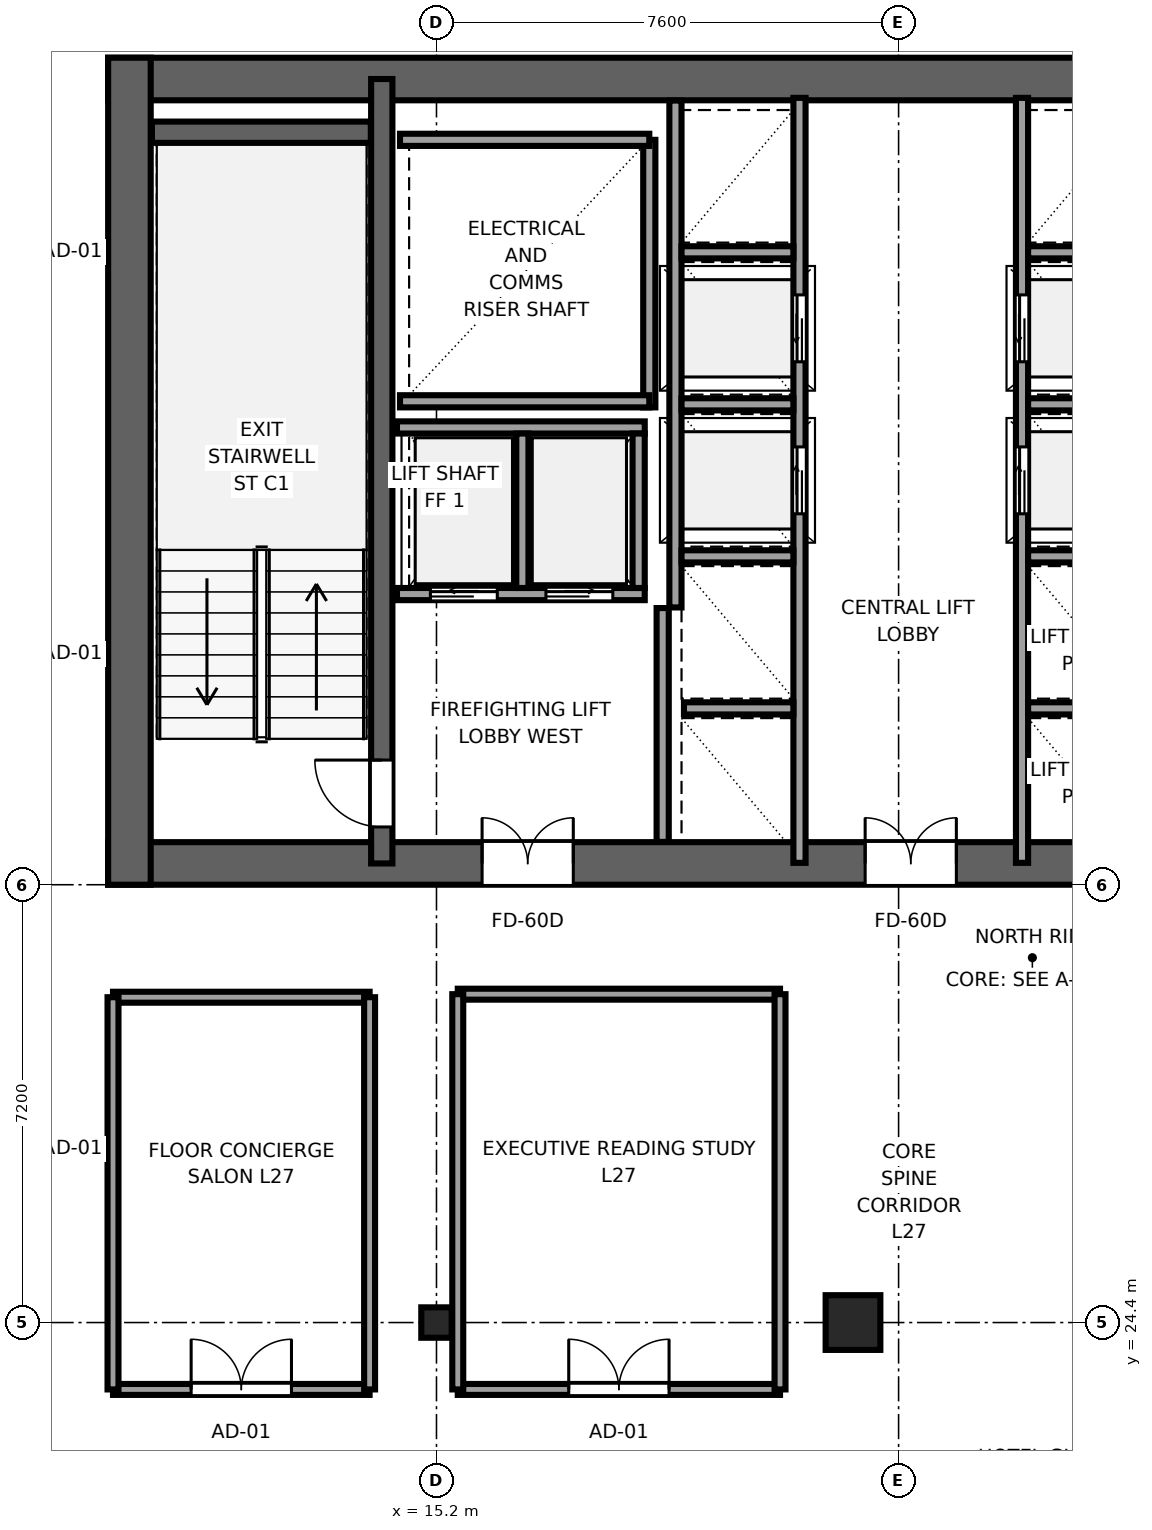
"""IFC4 building model, lengths in metres.
Left out: names, types, materials, properties, quantities, classifications, styles, units other than length and angle.
Written with IfcOpenShell. Run it as: python <this file> out.ifc"""

import sys

from ifc_helpers import new_model, si_unit, direction, frame, frame_2d, origin, origin_2d, place, context, subcontext, project, spatial, rectangle, i_section, extrude, source, transform, mapped, element, fill, save


model = new_model("IFC4")
c1 = context("Model", 3, precision=1e-05, world=origin(), true_north=direction((0.0, 1.0)))
c2 = subcontext(c1, "Body", "Model", "MODEL_VIEW")
j1 = project(units=[si_unit("LENGTHUNIT", "METRE"), si_unit("PLANEANGLEUNIT", "RADIAN")], contexts=[c1])
p1 = place(None, origin())
s1 = spatial("IfcSite", under=j1, at=p1, CompositionType="ELEMENT")
p2 = place(p1, origin())
s2 = spatial("IfcBuilding", under=s1, at=p2, CompositionType="ELEMENT")
p3 = place(p2, frame((0.0, 0.0, 108.0)))
s3 = spatial("IfcBuildingStorey", under=s2, at=p3, CompositionType="ELEMENT", Elevation=108.0)
p4 = place(p3, frame((9.8, 31.95, 0.0), z_axis=(0.0, 0.0, 1.0), x_axis=(1.0, 0.0, 0.0)))
e1 = element("IfcWall", 1, at=p4, inside=s3, PredefinedType="SHEAR", context=c2, shape_type="SweptSolid", body=[
    extrude(rectangle(XDim=26.4, YDim=0.7, at=frame_2d((13.2, 0.0))), origin(), (0.0, 0.0, 1.0), 3.55),
])
p5 = place(p4, frame((7.65, 0.0, 0.0), z_axis=(0.0, 0.0, 1.0), x_axis=(-1.0, 0.0, 0.0)))
e2 = element("IfcOpeningElement", 2, at=p5, cuts=e1, PredefinedType="OPENING", context=c2, shape_type="SweptSolid", body=[
    extrude(rectangle(XDim=1.5, YDim=2.04, at=frame_2d((0.75, 1.02))), frame((0.0, 0.36, 0.0), z_axis=(0.0, -1.0, 0.0), x_axis=(1.0, 0.0, 0.0)), (0.0, 0.0, 1.0), 0.72),
])
p6 = place(p4, frame((13.95, 0.0, 0.0), z_axis=(0.0, 0.0, 1.0), x_axis=(-1.0, 0.0, 0.0)))
e3 = element("IfcOpeningElement", 3, at=p6, cuts=e1, PredefinedType="OPENING", context=c2, shape_type="SweptSolid", body=[
    extrude(rectangle(XDim=1.5, YDim=2.04, at=frame_2d((0.75, 1.02))), frame((0.0, 0.36, 0.0), z_axis=(0.0, -1.0, 0.0), x_axis=(1.0, 0.0, 0.0)), (0.0, 0.0, 1.0), 0.72),
])
p7 = place(p4, frame((20.25, 0.0, 0.0), z_axis=(0.0, 0.0, 1.0), x_axis=(-1.0, 0.0, 0.0)))
e4 = element("IfcOpeningElement", 4, at=p7, cuts=e1, PredefinedType="OPENING", context=c2, shape_type="SweptSolid", body=[
    extrude(rectangle(XDim=1.5, YDim=2.04, at=frame_2d((0.75, 1.02))), frame((0.0, 0.36, 0.0), z_axis=(0.0, -1.0, 0.0), x_axis=(1.0, 0.0, 0.0)), (0.0, 0.0, 1.0), 0.72),
])
p8 = place(p3, frame((9.8, 44.85, 0.0), z_axis=(0.0, 0.0, 1.0), x_axis=(1.0, 0.0, 0.0)))
e5 = element("IfcWall", 5, at=p8, inside=s3, PredefinedType="SHEAR", context=c2, shape_type="SweptSolid", body=[
    extrude(rectangle(XDim=26.4, YDim=0.7, at=frame_2d((13.2, 0.0))), origin(), (0.0, 0.0, 1.0), 3.55),
])
p9 = place(p3, frame((10.15, 31.6, 0.0), z_axis=(0.0, 0.0, 1.0), x_axis=(0.0, 1.0, 0.0)))
e6 = element("IfcWall", 6, at=p9, inside=s3, PredefinedType="SHEAR", context=c2, shape_type="SweptSolid", body=[
    extrude(rectangle(XDim=13.6, YDim=0.7, at=frame_2d((6.8, 0.0))), origin(), (0.0, 0.0, 1.0), 3.55),
])
p10 = place(p3, frame((14.3, 31.95, 0.0), z_axis=(0.0, 0.0, 1.0), x_axis=(0.0, 1.0, 0.0)))
e7 = element("IfcWall", 7, at=p10, inside=s3, PredefinedType="SHEAR", context=c2, shape_type="SweptSolid", body=[
    extrude(rectangle(XDim=12.9, YDim=0.35, at=frame_2d((6.45, 0.0))), origin(), (0.0, 0.0, 1.0), 3.55),
])
p11 = place(p10, frame((0.6, 0.0, 0.0)))
e8 = element("IfcOpeningElement", 8, at=p11, cuts=e7, PredefinedType="OPENING", context=c2, shape_type="SweptSolid", body=[
    extrude(rectangle(XDim=1.1, YDim=2.12, at=frame_2d((0.55, 1.06))), frame((0.0, 0.185, 0.0), z_axis=(0.0, -1.0, 0.0), x_axis=(1.0, 0.0, 0.0)), (0.0, 0.0, 1.0), 0.37),
])
p12 = place(p3, frame((10.52, 43.975, 0.0), z_axis=(0.0, 0.0, 1.0), x_axis=(1.0, 0.0, 0.0)))
e9 = element("IfcWall", 9, at=p12, inside=s3, PredefinedType="SHEAR", context=c2, shape_type="SweptSolid", body=[
    extrude(rectangle(XDim=3.6, YDim=0.35, at=frame_2d((1.8, 0.0))), origin(), (0.0, 0.0, 1.0), 3.55),
])
m1 = source(origin(), c2, "Body", "SweptSolid", [
    extrude(i_section(OverallWidth=0.5, OverallDepth=0.5, WebThickness=0.022, FlangeThickness=0.034, at=origin_2d()), origin(), (0.0, 0.0, 1.0), 3.55),
])
p13 = place(p3, frame((15.2, 24.4, 0.0), z_axis=(0.0, 0.0, 1.0), x_axis=(1.0, 0.0, 0.0)))
e10 = element("IfcColumn", 10, at=p13, inside=s3, PredefinedType="COLUMN", context=c2, shape_type="MappedRepresentation", body=[
    mapped(m1, transform((0.0, 0.0, 0.0), x_axis=(1.0, 0.0, 0.0), y_axis=(0.0, 1.0, 0.0), z_axis=(0.0, 0.0, 1.0), scale=1.0)),
])
m2 = source(origin(), c2, "Body", "SweptSolid", [
    extrude(rectangle(XDim=0.9, YDim=0.9, at=origin_2d()), origin(), (0.0, 0.0, 1.0), 3.55),
])
p14 = place(p3, frame((22.05, 24.4, 0.0), z_axis=(0.0, 0.0, 1.0), x_axis=(1.0, 0.0, 0.0)))
e11 = element("IfcColumn", 11, at=p14, inside=s3, PredefinedType="COLUMN", context=c2, shape_type="MappedRepresentation", body=[
    mapped(m2, transform((0.0, 0.0, 0.0), x_axis=(1.0, 0.0, 0.0), y_axis=(0.0, 1.0, 0.0), z_axis=(0.0, 0.0, 1.0), scale=1.0)),
])
p15 = place(p3, frame((18.7, 39.45, 0.0), z_axis=(0.0, 0.0, 1.0), x_axis=(0.0, 1.0, 0.0)))
e12 = element("IfcWall", 12, at=p15, inside=s3, PredefinedType="SOLIDWALL", context=c2, shape_type="SweptSolid", body=[
    extrude(rectangle(XDim=4.4, YDim=0.2, at=frame_2d((2.2, 0.0))), origin(), (0.0, 0.0, 1.0), 3.37),
])
for number, where, z_axis, x_axis in (
    (13, (14.6, 39.55, 0.0), (0.0, 0.0, 1.0), (1.0, 0.0, 0.0)),
    (14, (14.6, 43.85, 0.0), (0.0, 0.0, 1.0), (1.0, 0.0, 0.0)),
):
    element("IfcWall", number, at=place(p3, frame(where, z_axis=z_axis, x_axis=x_axis)), inside=s3, PredefinedType="SOLIDWALL", context=c2, shape_type="SweptSolid", body=[
        extrude(rectangle(XDim=4.1, YDim=0.2, at=frame_2d((2.05, 0.0))), origin(), (0.0, 0.0, 1.0), 3.37),
    ])
p16 = place(p3, frame((18.92, 32.304, 0.0), z_axis=(0.0, 0.0, 1.0), x_axis=(0.0, 1.0, 0.0)))
e15 = element("IfcWall", 15, at=p16, inside=s3, PredefinedType="SOLIDWALL", context=c2, shape_type="SweptSolid", body=[
    extrude(rectangle(XDim=3.846, YDim=0.2, at=frame_2d((1.923, 0.0))), origin(), (0.0, 0.0, 1.0), 3.37),
])
p17 = place(p3, frame((21.17, 31.96, 0.0), z_axis=(0.0, 0.0, 1.0), x_axis=(0.0, 1.0, 0.0)))
e16 = element("IfcWall", 16, at=p17, inside=s3, PredefinedType="SOLIDWALL", context=c2, shape_type="SweptSolid", body=[
    extrude(rectangle(XDim=12.58, YDim=0.2, at=frame_2d((6.29, 0.0))), origin(), (0.0, 0.0, 1.0), 3.37),
])
p18 = place(p17, frame((5.74, 0.0, 0.0)))
e17 = element("IfcOpeningElement", 17, at=p18, cuts=e16, PredefinedType="OPENING", context=c2, shape_type="SweptSolid", body=[
    extrude(rectangle(XDim=1.1, YDim=2.12, at=frame_2d((0.55, 1.06))), frame((0.0, 0.11, 0.0), z_axis=(0.0, -1.0, 0.0), x_axis=(1.0, 0.0, 0.0)), (0.0, 0.0, 1.0), 0.22),
])
p19 = place(p17, frame((8.24, 0.0, 0.0)))
e18 = element("IfcOpeningElement", 18, at=p19, cuts=e16, PredefinedType="OPENING", context=c2, shape_type="SweptSolid", body=[
    extrude(rectangle(XDim=1.1, YDim=2.12, at=frame_2d((0.55, 1.06))), frame((0.0, 0.11, 0.0), z_axis=(0.0, -1.0, 0.0), x_axis=(1.0, 0.0, 0.0)), (0.0, 0.0, 1.0), 0.22),
])
p20 = place(p3, frame((19.13, 36.16, 0.0), z_axis=(0.0, 0.0, 1.0), x_axis=(0.0, 1.0, 0.0)))
e19 = element("IfcWall", 19, at=p20, inside=s3, PredefinedType="SOLIDWALL", context=c2, shape_type="SweptSolid", body=[
    extrude(rectangle(XDim=8.336, YDim=0.2, at=frame_2d((4.168, 0.0))), origin(), (0.0, 0.0, 1.0), 3.37),
])
p21 = place(p3, frame((19.27, 34.5, 0.0), z_axis=(0.0, 0.0, 1.0), x_axis=(1.0, 0.0, 0.0)))
e20 = element("IfcWall", 20, at=p21, inside=s3, PredefinedType="SOLIDWALL", context=c2, shape_type="SweptSolid", body=[
    extrude(rectangle(XDim=1.8, YDim=0.2, at=frame_2d((0.9, 0.0))), origin(), (0.0, 0.0, 1.0), 3.37),
])
for number, where, z_axis, x_axis in (
    (21, (19.23, 37.0, 0.0), (0.0, 0.0, 1.0), (1.0, 0.0, 0.0)),
    (22, (19.23, 39.5, 0.0), (0.0, 0.0, 1.0), (1.0, 0.0, 0.0)),
    (23, (19.23, 42.0, 0.0), (0.0, 0.0, 1.0), (1.0, 0.0, 0.0)),
):
    element("IfcWall", number, at=place(p3, frame(where, z_axis=z_axis, x_axis=x_axis)), inside=s3, PredefinedType="SOLIDWALL", context=c2, shape_type="SweptSolid", body=[
        extrude(rectangle(XDim=1.84, YDim=0.2, at=frame_2d((0.92, 0.0))), origin(), (0.0, 0.0, 1.0), 3.37),
    ])
p22 = place(p3, frame((14.55, 36.38, 0.0), z_axis=(0.0, 0.0, 1.0), x_axis=(1.0, 0.0, 0.0)))
e24 = element("IfcWall", 24, at=p22, inside=s3, PredefinedType="SOLIDWALL", context=c2, shape_type="SweptSolid", body=[
    extrude(rectangle(XDim=4.075, YDim=0.2, at=frame_2d((2.038, 0.0))), origin(), (0.0, 0.0, 1.0), 3.37),
])
p23 = place(p22, frame((0.55, 0.0, 0.0)))
e25 = element("IfcOpeningElement", 25, at=p23, cuts=e24, PredefinedType="OPENING", context=c2, shape_type="SweptSolid", body=[
    extrude(rectangle(XDim=1.1, YDim=2.12, at=frame_2d((0.55, 1.06))), frame((0.0, 0.11, 0.0), z_axis=(0.0, -1.0, 0.0), x_axis=(1.0, 0.0, 0.0)), (0.0, 0.0, 1.0), 0.22),
])
p24 = place(p22, frame((2.45, 0.0, 0.0)))
e26 = element("IfcOpeningElement", 26, at=p24, cuts=e24, PredefinedType="OPENING", context=c2, shape_type="SweptSolid", body=[
    extrude(rectangle(XDim=1.1, YDim=2.12, at=frame_2d((0.55, 1.06))), frame((0.0, 0.11, 0.0), z_axis=(0.0, -1.0, 0.0), x_axis=(1.0, 0.0, 0.0)), (0.0, 0.0, 1.0), 0.22),
])
p25 = place(p3, frame((14.55, 39.12, 0.0), z_axis=(0.0, 0.0, 1.0), x_axis=(1.0, 0.0, 0.0)))
e27 = element("IfcWall", 27, at=p25, inside=s3, PredefinedType="SOLIDWALL", context=c2, shape_type="SweptSolid", body=[
    extrude(rectangle(XDim=4.075, YDim=0.2, at=frame_2d((2.038, 0.0))), origin(), (0.0, 0.0, 1.0), 3.37),
])
for number, where, z_axis, x_axis in (
    (28, (18.525, 36.48, 0.0), (0.0, 0.0, 1.0), (0.0, 1.0, 0.0)),
    (29, (16.613, 36.48, 0.0), (0.0, 0.0, 1.0), (0.0, 1.0, 0.0)),
):
    element("IfcWall", number, at=place(p3, frame(where, z_axis=z_axis, x_axis=x_axis)), inside=s3, PredefinedType="SOLIDWALL", context=c2, shape_type="SweptSolid", body=[
        extrude(rectangle(XDim=2.54, YDim=0.2, at=frame_2d((1.27, 0.0))), origin(), (0.0, 0.0, 1.0), 3.37),
    ])
p26 = place(p3, frame((24.83, 31.96, 0.0), z_axis=(0.0, 0.0, 1.0), x_axis=(0.0, 1.0, 0.0)))
e30 = element("IfcWall", 30, at=p26, inside=s3, PredefinedType="SOLIDWALL", context=c2, shape_type="SweptSolid", body=[
    extrude(rectangle(XDim=12.58, YDim=0.2, at=frame_2d((6.29, 0.0))), origin(), (0.0, 0.0, 1.0), 3.37),
])
p27 = place(p26, frame((5.74, 0.0, 0.0)))
e31 = element("IfcOpeningElement", 31, at=p27, cuts=e30, PredefinedType="OPENING", context=c2, shape_type="SweptSolid", body=[
    extrude(rectangle(XDim=1.1, YDim=2.12, at=frame_2d((0.55, 1.06))), frame((0.0, 0.11, 0.0), z_axis=(0.0, -1.0, 0.0), x_axis=(1.0, 0.0, 0.0)), (0.0, 0.0, 1.0), 0.22),
])
p28 = place(p26, frame((8.24, 0.0, 0.0)))
e32 = element("IfcOpeningElement", 32, at=p28, cuts=e30, PredefinedType="OPENING", context=c2, shape_type="SweptSolid", body=[
    extrude(rectangle(XDim=1.1, YDim=2.12, at=frame_2d((0.55, 1.06))), frame((0.0, 0.11, 0.0), z_axis=(0.0, -1.0, 0.0), x_axis=(1.0, 0.0, 0.0)), (0.0, 0.0, 1.0), 0.22),
])
p29 = place(p3, frame((24.93, 34.5, 0.0), z_axis=(0.0, 0.0, 1.0), x_axis=(1.0, 0.0, 0.0)))
e33 = element("IfcWall", 33, at=p29, inside=s3, PredefinedType="SOLIDWALL", context=c2, shape_type="SweptSolid", body=[
    extrude(rectangle(XDim=1.8, YDim=0.2, at=frame_2d((0.9, 0.0))), origin(), (0.0, 0.0, 1.0), 3.37),
])
for number, where, z_axis, x_axis in (
    (34, (24.93, 37.0, 0.0), (0.0, 0.0, 1.0), (1.0, 0.0, 0.0)),
    (35, (24.93, 39.5, 0.0), (0.0, 0.0, 1.0), (1.0, 0.0, 0.0)),
    (36, (24.93, 42.0, 0.0), (0.0, 0.0, 1.0), (1.0, 0.0, 0.0)),
):
    element("IfcWall", number, at=place(p3, frame(where, z_axis=z_axis, x_axis=x_axis)), inside=s3, PredefinedType="SOLIDWALL", context=c2, shape_type="SweptSolid", body=[
        extrude(rectangle(XDim=1.84, YDim=0.2, at=frame_2d((0.92, 0.0))), origin(), (0.0, 0.0, 1.0), 3.37),
    ])
p30 = place(p3, frame((9.88, 23.3, 0.0), z_axis=(0.0, 0.0, 1.0), x_axis=(1.0, 0.0, 0.0)))
e37 = element("IfcWall", 37, at=p30, inside=s3, PredefinedType="PARTITIONING", context=c2, shape_type="SweptSolid", body=[
    extrude(rectangle(XDim=4.22, YDim=0.18, at=frame_2d((2.11, 0.0))), origin(), (0.0, 0.0, 1.0), 3.37),
])
p31 = place(p30, frame((1.285, 0.0, 0.0)))
e38 = element("IfcOpeningElement", 38, at=p31, cuts=e37, PredefinedType="OPENING", context=c2, shape_type="SweptSolid", body=[
    extrude(rectangle(XDim=1.65, YDim=2.15, at=frame_2d((0.825, 1.075))), frame((0.0, 0.1, 0.0), z_axis=(0.0, -1.0, 0.0), x_axis=(1.0, 0.0, 0.0)), (0.0, 0.0, 1.0), 0.2),
])
p32 = place(p3, frame((9.88, 29.75, 0.0), z_axis=(0.0, 0.0, 1.0), x_axis=(1.0, 0.0, 0.0)))
e39 = element("IfcWall", 39, at=p32, inside=s3, PredefinedType="PARTITIONING", context=c2, shape_type="SweptSolid", body=[
    extrude(rectangle(XDim=4.22, YDim=0.18, at=frame_2d((2.11, 0.0))), origin(), (0.0, 0.0, 1.0), 3.37),
])
for number, where, z_axis, x_axis in (
    (40, (9.88, 23.3, 0.0), (0.0, 0.0, 1.0), (0.0, 1.0, 0.0)),
    (41, (14.1, 23.3, 0.0), (0.0, 0.0, 1.0), (0.0, 1.0, 0.0)),
):
    element("IfcWall", number, at=place(p3, frame(where, z_axis=z_axis, x_axis=x_axis)), inside=s3, PredefinedType="PARTITIONING", context=c2, shape_type="SweptSolid", body=[
        extrude(rectangle(XDim=6.45, YDim=0.18, at=frame_2d((3.225, 0.0))), origin(), (0.0, 0.0, 1.0), 3.37),
    ])
p33 = place(p3, frame((15.55, 23.3, 0.0), z_axis=(0.0, 0.0, 1.0), x_axis=(1.0, 0.0, 0.0)))
e42 = element("IfcWall", 42, at=p33, inside=s3, PredefinedType="PARTITIONING", context=c2, shape_type="SweptSolid", body=[
    extrude(rectangle(XDim=5.3, YDim=0.18, at=frame_2d((2.65, 0.0))), origin(), (0.0, 0.0, 1.0), 3.37),
])
p34 = place(p33, frame((1.825, 0.0, 0.0)))
e43 = element("IfcOpeningElement", 43, at=p34, cuts=e42, PredefinedType="OPENING", context=c2, shape_type="SweptSolid", body=[
    extrude(rectangle(XDim=1.65, YDim=2.15, at=frame_2d((0.825, 1.075))), frame((0.0, 0.1, 0.0), z_axis=(0.0, -1.0, 0.0), x_axis=(1.0, 0.0, 0.0)), (0.0, 0.0, 1.0), 0.2),
])
p35 = place(p3, frame((15.55, 29.8, 0.0), z_axis=(0.0, 0.0, 1.0), x_axis=(1.0, 0.0, 0.0)))
e44 = element("IfcWall", 44, at=p35, inside=s3, PredefinedType="PARTITIONING", context=c2, shape_type="SweptSolid", body=[
    extrude(rectangle(XDim=5.3, YDim=0.18, at=frame_2d((2.65, 0.0))), origin(), (0.0, 0.0, 1.0), 3.37),
])
for number, where, z_axis, x_axis in (
    (45, (15.55, 23.3, 0.0), (0.0, 0.0, 1.0), (0.0, 1.0, 0.0)),
    (46, (20.85, 23.3, 0.0), (0.0, 0.0, 1.0), (0.0, 1.0, 0.0)),
):
    element("IfcWall", number, at=place(p3, frame(where, z_axis=z_axis, x_axis=x_axis)), inside=s3, PredefinedType="PARTITIONING", context=c2, shape_type="SweptSolid", body=[
        extrude(rectangle(XDim=6.5, YDim=0.18, at=frame_2d((3.25, 0.0))), origin(), (0.0, 0.0, 1.0), 3.37),
    ])
m3 = source(origin(), c2, "Body", "SweptSolid", [
    extrude(rectangle(XDim=1.1, YDim=2.12, at=frame_2d((0.55, 1.06))), frame((0.0, 0.025, 0.0), z_axis=(0.0, -1.0, 0.0), x_axis=(1.0, 0.0, 0.0)), (0.0, 0.0, 1.0), 0.05),
])
p36 = place(p11, origin())
e47 = element("IfcDoor", 47, at=p36, inside=s3, OperationType="SINGLE_SWING_RIGHT", PredefinedType="DOOR", context=c2, shape_type="MappedRepresentation", body=[
    mapped(m3, transform((0.0, 0.0, 0.0), x_axis=(1.0, 0.0, 0.0), y_axis=(0.0, 1.0, 0.0), z_axis=(0.0, 0.0, 1.0), scale=1.0)),
])
fill(e8, e47)
m4 = source(origin(), c2, "Body", "SweptSolid", [
    extrude(rectangle(XDim=1.5, YDim=2.04, at=frame_2d((0.75, 1.02))), frame((0.0, 0.025, 0.0), z_axis=(0.0, -1.0, 0.0), x_axis=(1.0, 0.0, 0.0)), (0.0, 0.0, 1.0), 0.05),
])
p37 = place(p5, origin())
e48 = element("IfcDoor", 48, at=p37, inside=s3, OperationType="DOUBLE_DOOR_SINGLE_SWING", PredefinedType="DOOR", context=c2, shape_type="MappedRepresentation", body=[
    mapped(m4, transform((0.0, 0.0, 0.0), x_axis=(1.0, 0.0, 0.0), y_axis=(0.0, 1.0, 0.0), z_axis=(0.0, 0.0, 1.0), scale=1.0)),
])
fill(e2, e48)
p38 = place(p6, origin())
e49 = element("IfcDoor", 49, at=p38, inside=s3, OperationType="DOUBLE_DOOR_SINGLE_SWING", PredefinedType="DOOR", context=c2, shape_type="MappedRepresentation", body=[
    mapped(m4, transform((0.0, 0.0, 0.0), x_axis=(1.0, 0.0, 0.0), y_axis=(0.0, 1.0, 0.0), z_axis=(0.0, 0.0, 1.0), scale=1.0)),
])
fill(e3, e49)
m5 = source(origin(), c2, "Body", "SweptSolid", [
    extrude(rectangle(XDim=1.1, YDim=2.12, at=frame_2d((0.55, 1.06))), frame((0.0, 0.025, 0.0), z_axis=(0.0, -1.0, 0.0), x_axis=(1.0, 0.0, 0.0)), (0.0, 0.0, 1.0), 0.05),
])
p39 = place(p18, origin())
e50 = element("IfcDoor", 50, at=p39, inside=s3, OperationType="SLIDING_TO_RIGHT", PredefinedType="DOOR", context=c2, shape_type="MappedRepresentation", body=[
    mapped(m5, transform((0.0, 0.0, 0.0), x_axis=(1.0, 0.0, 0.0), y_axis=(0.0, 1.0, 0.0), z_axis=(0.0, 0.0, 1.0), scale=1.0)),
])
fill(e17, e50)
p40 = place(p19, origin())
e51 = element("IfcDoor", 51, at=p40, inside=s3, OperationType="SLIDING_TO_LEFT", PredefinedType="DOOR", context=c2, shape_type="MappedRepresentation", body=[
    mapped(m5, transform((0.0, 0.0, 0.0), x_axis=(1.0, 0.0, 0.0), y_axis=(0.0, 1.0, 0.0), z_axis=(0.0, 0.0, 1.0), scale=1.0)),
])
fill(e18, e51)
p41 = place(p23, origin())
e52 = element("IfcDoor", 52, at=p41, inside=s3, OperationType="SLIDING_TO_LEFT", PredefinedType="DOOR", context=c2, shape_type="MappedRepresentation", body=[
    mapped(m5, transform((0.0, 0.0, 0.0), x_axis=(1.0, 0.0, 0.0), y_axis=(0.0, 1.0, 0.0), z_axis=(0.0, 0.0, 1.0), scale=1.0)),
])
fill(e25, e52)
p42 = place(p24, origin())
e53 = element("IfcDoor", 53, at=p42, inside=s3, OperationType="SLIDING_TO_RIGHT", PredefinedType="DOOR", context=c2, shape_type="MappedRepresentation", body=[
    mapped(m5, transform((0.0, 0.0, 0.0), x_axis=(1.0, 0.0, 0.0), y_axis=(0.0, 1.0, 0.0), z_axis=(0.0, 0.0, 1.0), scale=1.0)),
])
fill(e26, e53)
p43 = place(p27, origin())
e54 = element("IfcDoor", 54, at=p43, inside=s3, OperationType="SLIDING_TO_RIGHT", PredefinedType="DOOR", context=c2, shape_type="MappedRepresentation", body=[
    mapped(m5, transform((0.0, 0.0, 0.0), x_axis=(1.0, 0.0, 0.0), y_axis=(0.0, 1.0, 0.0), z_axis=(0.0, 0.0, 1.0), scale=1.0)),
])
fill(e31, e54)
p44 = place(p28, origin())
e55 = element("IfcDoor", 55, at=p44, inside=s3, OperationType="SLIDING_TO_LEFT", PredefinedType="DOOR", context=c2, shape_type="MappedRepresentation", body=[
    mapped(m5, transform((0.0, 0.0, 0.0), x_axis=(1.0, 0.0, 0.0), y_axis=(0.0, 1.0, 0.0), z_axis=(0.0, 0.0, 1.0), scale=1.0)),
])
fill(e32, e55)
m6 = source(origin(), c2, "Body", "SweptSolid", [
    extrude(rectangle(XDim=1.65, YDim=2.15, at=frame_2d((0.825, 1.075))), frame((0.0, 0.025, 0.0), z_axis=(0.0, -1.0, 0.0), x_axis=(1.0, 0.0, 0.0)), (0.0, 0.0, 1.0), 0.05),
])
p45 = place(p31, origin())
e56 = element("IfcDoor", 56, at=p45, inside=s3, OperationType="DOUBLE_DOOR_SINGLE_SWING", PredefinedType="DOOR", context=c2, shape_type="MappedRepresentation", body=[
    mapped(m6, transform((0.0, 0.0, 0.0), x_axis=(1.0, 0.0, 0.0), y_axis=(0.0, 1.0, 0.0), z_axis=(0.0, 0.0, 1.0), scale=1.0)),
])
fill(e38, e56)
p46 = place(p34, origin())
e57 = element("IfcDoor", 57, at=p46, inside=s3, OperationType="DOUBLE_DOOR_SINGLE_SWING", PredefinedType="DOOR", context=c2, shape_type="MappedRepresentation", body=[
    mapped(m6, transform((0.0, 0.0, 0.0), x_axis=(1.0, 0.0, 0.0), y_axis=(0.0, 1.0, 0.0), z_axis=(0.0, 0.0, 1.0), scale=1.0)),
])
fill(e43, e57)
save(model, sys.argv[1])
